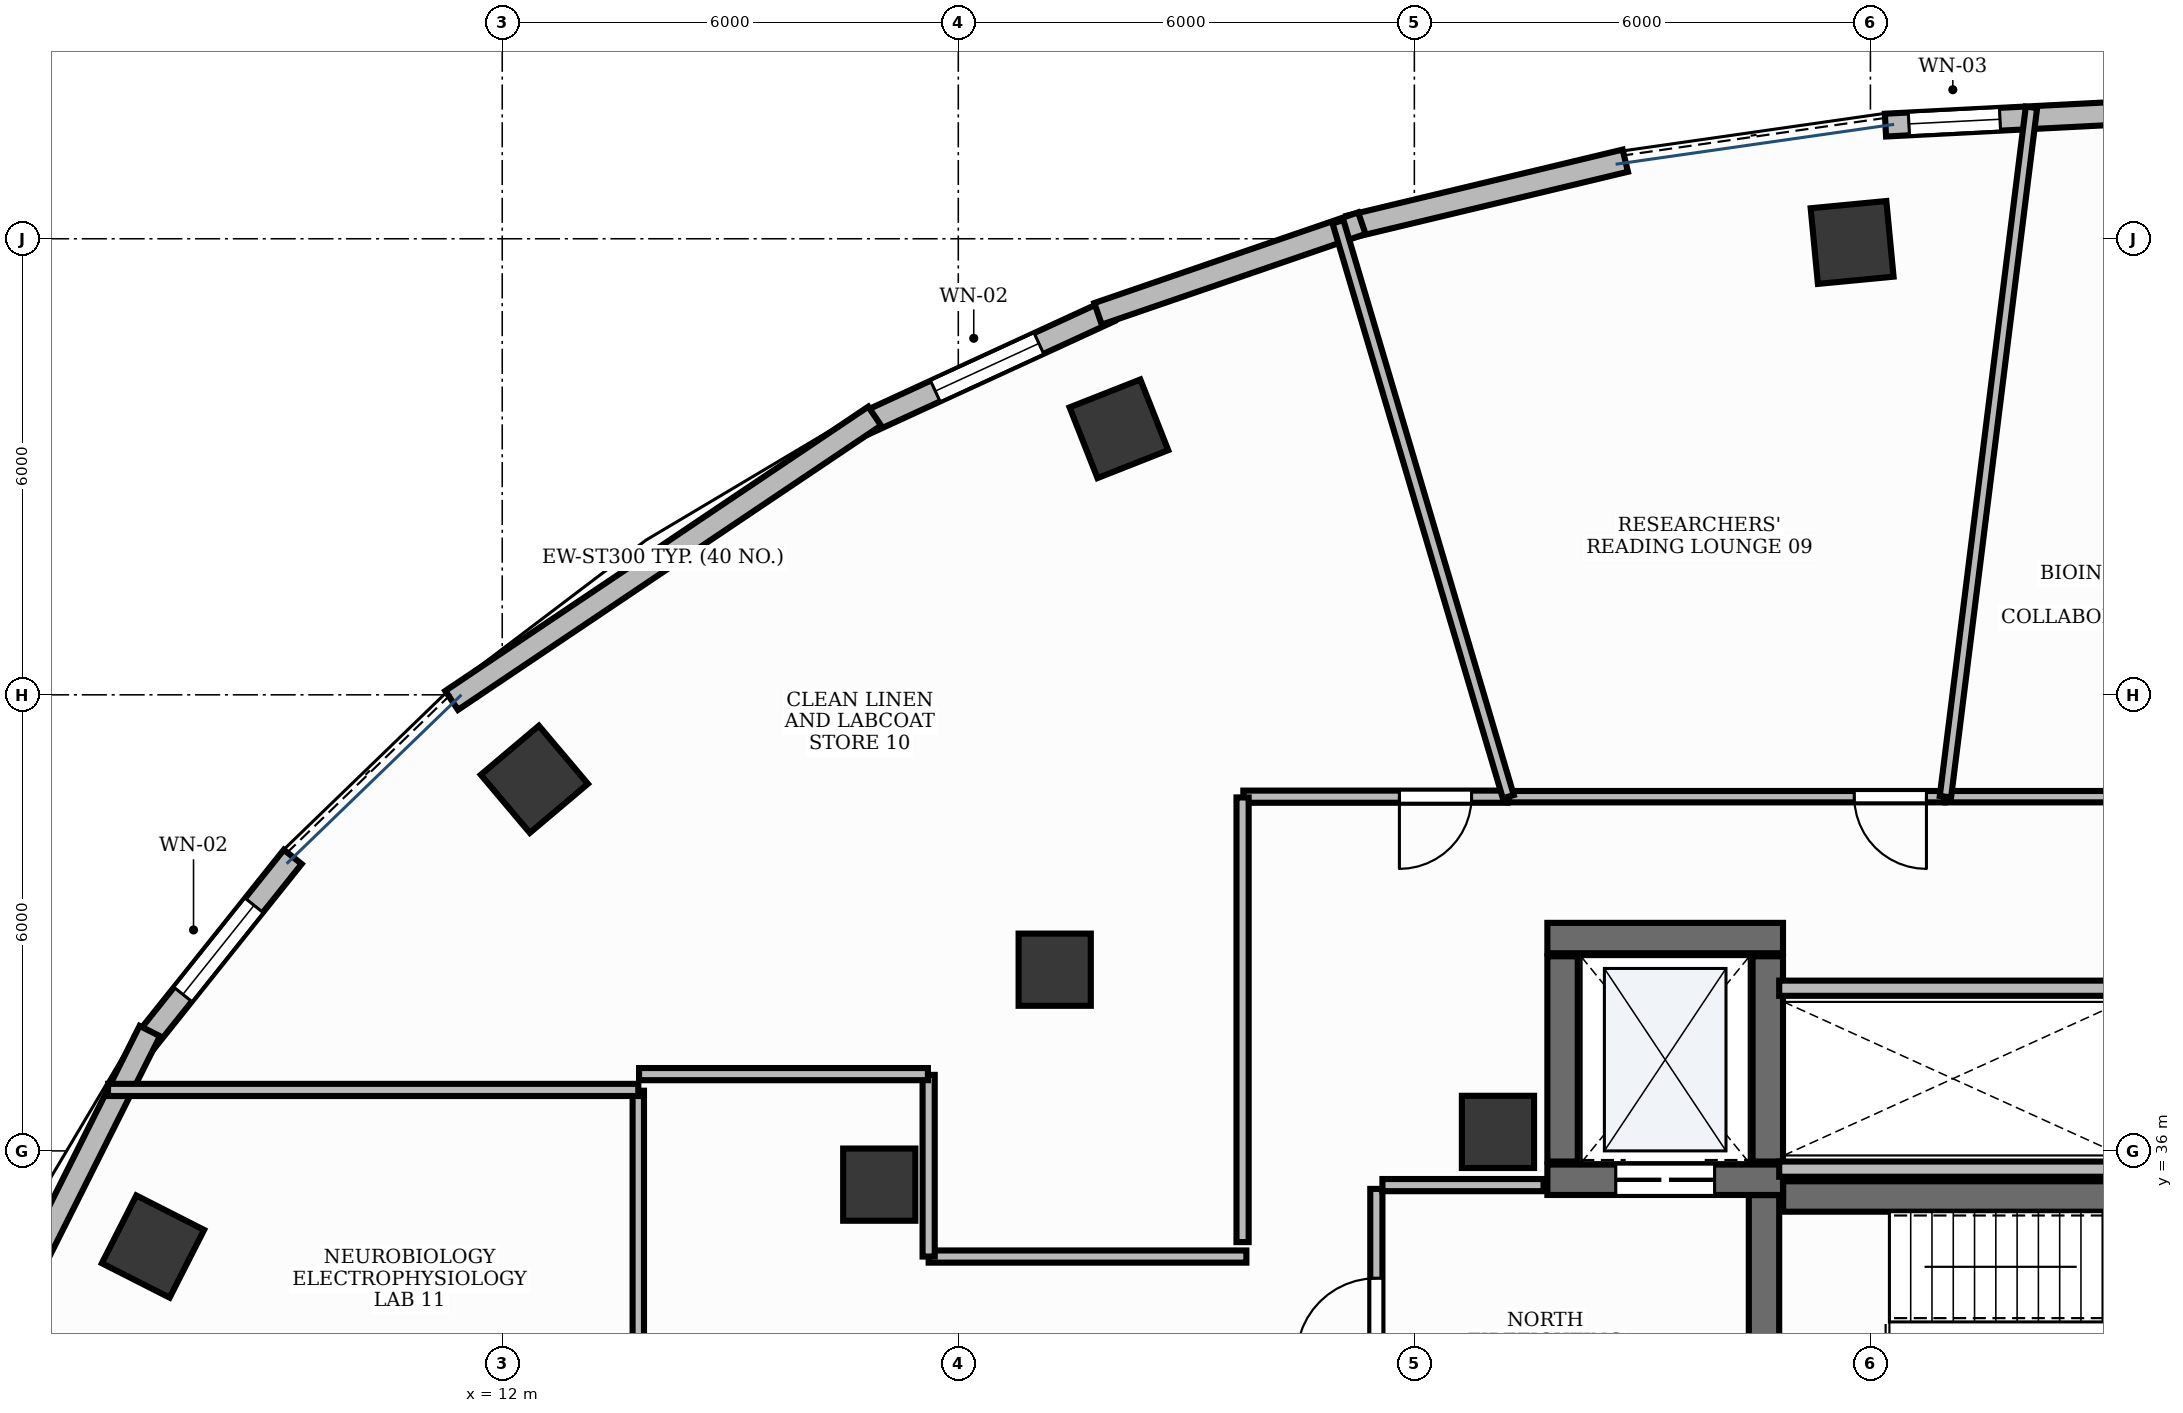
"""IFC4 building model, lengths in metres.
Left out: names, types, materials, properties, quantities, classifications, styles, units other than length and angle.
Written with IfcOpenShell. Run it as: python <this file> out.ifc"""

import sys

from ifc_helpers import new_model, si_unit, direction, frame, frame_2d, origin, origin_2d, place, context, subcontext, project, spatial, rectangle, extrude, element, fill, save


model = new_model("IFC4")
c1 = context("Model", 3, precision=1e-05, world=origin(), true_north=direction((0.0, 1.0)))
c2 = subcontext(c1, "Body", "Model", "MODEL_VIEW")
j1 = project(units=[si_unit("LENGTHUNIT", "METRE"), si_unit("PLANEANGLEUNIT", "RADIAN")], contexts=[c1])
p1 = place(None, origin())
s1 = spatial("IfcSite", under=j1, at=p1, CompositionType="ELEMENT")
p2 = place(p1, origin())
s2 = spatial("IfcBuilding", under=s1, at=p2, CompositionType="ELEMENT")
p3 = place(p2, frame((0.0, 0.0, 218.4)))
s3 = spatial("IfcBuildingStorey", under=s2, at=p3, CompositionType="ELEMENT", Elevation=218.4)
p4 = place(p3, frame((28.852, 35.4, 0.0), z_axis=(0.0, 0.0, 1.0), x_axis=(1.0, 0.0, 0.0)))
e1 = element("IfcWall", 1, at=p4, inside=s3, PredefinedType="SHEAR", context=c2, shape_type="SweptSolid", body=[
    extrude(rectangle(XDim=8.198, YDim=0.4, at=frame_2d((4.099, 0.0))), origin(), (0.0, 0.0, 1.0), 3.9),
])
p5 = place(p3, frame((28.6, 32.11, 0.0), z_axis=(0.0, 0.0, 1.0), x_axis=(0.0, 1.0, 0.0)))
e2 = element("IfcWall", 2, at=p5, inside=s3, PredefinedType="SHEAR", context=c2, shape_type="SweptSolid", body=[
    extrude(rectangle(XDim=3.308, YDim=0.4, at=frame_2d((1.654, 0.0))), origin(), (0.0, 0.0, 1.0), 3.9),
])
p6 = place(p5, frame((0.2, 0.0, 0.0)))
e3 = element("IfcOpeningElement", 3, at=p6, cuts=e2, PredefinedType="OPENING", context=c2, shape_type="SweptSolid", body=[
    extrude(rectangle(XDim=1.05, YDim=2.15, at=frame_2d((0.525, 1.075))), frame((0.0, 0.215, 0.0), z_axis=(0.0, -1.0, 0.0), x_axis=(1.0, 0.0, 0.0)), (0.0, 0.0, 1.0), 0.43),
])
p7 = place(p3, frame((25.75, 38.8, 0.0), z_axis=(0.0, 0.0, 1.0), x_axis=(1.0, 0.0, 0.0)))
e4 = element("IfcWall", 4, at=p7, inside=s3, PredefinedType="SHEAR", context=c2, shape_type="SweptSolid", body=[
    extrude(rectangle(XDim=3.1, YDim=0.4, at=frame_2d((1.55, 0.0))), origin(), (0.0, 0.0, 1.0), 3.9),
])
p8 = place(p3, frame((25.75, 35.62, 0.0), z_axis=(0.0, 0.0, 1.0), x_axis=(1.0, 0.0, 0.0)))
e5 = element("IfcWall", 5, at=p8, inside=s3, PredefinedType="SHEAR", context=c2, shape_type="SweptSolid", body=[
    extrude(rectangle(XDim=3.1, YDim=0.4, at=frame_2d((1.55, 0.0))), origin(), (0.0, 0.0, 1.0), 3.9),
])
p9 = place(p8, frame((0.9, 0.0, 0.0)))
e6 = element("IfcOpeningElement", 6, at=p9, cuts=e5, PredefinedType="OPENING", context=c2, shape_type="SweptSolid", body=[
    extrude(rectangle(XDim=1.3, YDim=2.2, at=frame_2d((0.65, 1.1))), frame((0.0, 0.215, 0.0), z_axis=(0.0, -1.0, 0.0), x_axis=(1.0, 0.0, 0.0)), (0.0, 0.0, 1.0), 0.43),
])
for number, where, z_axis, x_axis in (
    (7, (25.95, 35.86, 0.0), (0.0, 0.0, 1.0), (0.0, 1.0, 0.0)),
    (8, (28.65, 35.86, 0.0), (0.0, 0.0, 1.0), (0.0, 1.0, 0.0)),
):
    element("IfcWall", number, at=place(p3, frame(where, z_axis=z_axis, x_axis=x_axis)), inside=s3, PredefinedType="SHEAR", context=c2, shape_type="SweptSolid", body=[
        extrude(rectangle(XDim=2.7, YDim=0.4, at=frame_2d((1.35, 0.0))), origin(), (0.0, 0.0, 1.0), 3.9),
    ])
p10 = place(p3, frame((25.1, 36.25, -0.0), z_axis=(0.0, 0.0, 1.0), x_axis=(1.0, 0.0, 0.0)))
e9 = element("IfcColumn", 9, at=p10, inside=s3, PredefinedType="PILASTER", context=c2, shape_type="SweptSolid", body=[
    extrude(rectangle(XDim=0.95, YDim=0.95, at=origin_2d()), origin(), (0.0, 0.0, 1.0), 3.901),
])
for number, where, z_axis, x_axis in (
    (10, (29.759, 47.951, -0.0), (0.0, 0.0, 1.0), (0.995, 0.095, 0.0)),
    (11, (20.113, 45.5, -0.0), (0.0, 0.0, 1.0), (0.93, 0.367, 0.0)),
    (12, (12.423, 40.889, -0.0), (0.0, 0.0, 1.0), (0.764, 0.645, 0.0)),
):
    element("IfcColumn", number, at=place(p3, frame(where, z_axis=z_axis, x_axis=x_axis)), inside=s3, PredefinedType="COLUMN", context=c2, shape_type="SweptSolid", body=[
        extrude(rectangle(XDim=1.0, YDim=1.0, at=origin_2d()), origin(), (0.0, 0.0, 1.0), 3.901),
    ])
p11 = place(p3, frame((19.268, 38.384, -0.0), z_axis=(0.0, 0.0, 1.0), x_axis=(1.0, 0.0, 0.0)))
e13 = element("IfcColumn", 13, at=p11, inside=s3, PredefinedType="COLUMN", context=c2, shape_type="SweptSolid", body=[
    extrude(rectangle(XDim=0.95, YDim=0.95, at=origin_2d()), origin(), (0.0, 0.0, 1.0), 3.901),
])
p12 = place(p3, frame((7.405, 34.741, -0.0), z_axis=(0.0, 0.0, 1.0), x_axis=(0.453057191132, 0.891481453292, 0.0)))
e14 = element("IfcColumn", 14, at=p12, inside=s3, PredefinedType="COLUMN", context=c2, shape_type="SweptSolid", body=[
    extrude(rectangle(XDim=1.0, YDim=1.0, at=origin_2d()), origin(), (0.0, 0.0, 1.0), 3.901),
])
p13 = place(p3, frame((16.96, 35.556, -0.0), z_axis=(0.0, 0.0, 1.0), x_axis=(1.0, 0.0, 0.0)))
e15 = element("IfcColumn", 15, at=p13, inside=s3, PredefinedType="COLUMN", context=c2, shape_type="SweptSolid", body=[
    extrude(rectangle(XDim=0.95, YDim=0.95, at=origin_2d()), origin(), (0.0, 0.0, 1.0), 3.901),
])
p14 = place(p3, frame((33.958, 49.688, 0.0), z_axis=(0.0, 0.0, 1.0), x_axis=(-0.998693948377, -0.051092049037, 0.0)))
e16 = element("IfcWall", 16, at=p14, inside=s3, PredefinedType="STANDARD", context=c2, shape_type="SweptSolid", body=[
    extrude(rectangle(XDim=3.765, YDim=0.3, at=frame_2d((1.883, 0.0))), origin(), (0.0, 0.0, 1.0), 3.9),
])
p15 = place(p14, frame((2.257, 0.0, 0.9)))
e17 = element("IfcOpeningElement", 17, at=p15, cuts=e16, PredefinedType="OPENING", context=c2, shape_type="SweptSolid", body=[
    extrude(rectangle(XDim=1.2, YDim=2.7, at=frame_2d((0.6, 1.35))), frame((0.0, 0.165, 0.0), z_axis=(0.0, -1.0, 0.0), x_axis=(1.0, 0.0, 0.0)), (0.0, 0.0, 1.0), 0.33),
])
p16 = place(p3, frame((19.99, 47.051, 0.0), z_axis=(0.0, 0.0, 1.0), x_axis=(-0.908478431596, -0.41793174003, 0.0)))
e18 = element("IfcWall", 18, at=p16, inside=s3, PredefinedType="STANDARD", context=c2, shape_type="SweptSolid", body=[
    extrude(rectangle(XDim=3.547, YDim=0.3, at=frame_2d((1.773, 0.0))), origin(), (0.0, 0.0, 1.0), 3.9),
])
p17 = place(p16, frame((1.023, 0.0, 0.95)))
e19 = element("IfcOpeningElement", 19, at=p17, cuts=e18, PredefinedType="OPENING", context=c2, shape_type="SweptSolid", body=[
    extrude(rectangle(XDim=1.5, YDim=1.8, at=frame_2d((0.75, 0.9))), frame((0.0, 0.165, 0.0), z_axis=(0.0, -1.0, 0.0), x_axis=(1.0, 0.0, 0.0)), (0.0, 0.0, 1.0), 0.33),
])
p18 = place(p3, frame((9.244, 39.868, 0.0), z_axis=(0.0, 0.0, 1.0), x_axis=(-0.624095877763, -0.781347768512, 0.0)))
e20 = element("IfcWall", 20, at=p18, inside=s3, PredefinedType="STANDARD", context=c2, shape_type="SweptSolid", body=[
    extrude(rectangle(XDim=3.132, YDim=0.3, at=frame_2d((1.566, 0.0))), origin(), (0.0, 0.0, 1.0), 3.9),
])
p19 = place(p18, frame((0.816, 0.0, 0.95)))
e21 = element("IfcOpeningElement", 21, at=p19, cuts=e20, PredefinedType="OPENING", context=c2, shape_type="SweptSolid", body=[
    extrude(rectangle(XDim=1.5, YDim=1.8, at=frame_2d((0.75, 0.9))), frame((0.0, 0.165, 0.0), z_axis=(0.0, -1.0, 0.0), x_axis=(1.0, 0.0, 0.0)), (0.0, 0.0, 1.0), 0.33),
])
p20 = place(p3, frame((26.775, 49.027, 0.0), z_axis=(0.0, 0.0, 1.0), x_axis=(-0.972475629939, -0.233004611918, 0.0)))
e22 = element("IfcWall", 22, at=p20, inside=s3, PredefinedType="STANDARD", context=c2, shape_type="SweptSolid", body=[
    extrude(rectangle(XDim=3.735, YDim=0.3, at=frame_2d((1.868, 0.0))), origin(), (0.0, 0.0, 1.0), 3.9),
])
p21 = place(p3, frame((23.309, 48.205, 0.0), z_axis=(0.0, 0.0, 1.0), x_axis=(-0.945722383555, -0.32497565023, 0.0)))
e23 = element("IfcWall", 23, at=p21, inside=s3, PredefinedType="STANDARD", context=c2, shape_type="SweptSolid", body=[
    extrude(rectangle(XDim=3.67, YDim=0.3, at=frame_2d((1.835, 0.0))), origin(), (0.0, 0.0, 1.0), 3.47),
])
p22 = place(p3, frame((16.9, 45.667, 0.0), z_axis=(0.0, 0.0, 1.0), x_axis=(-0.829994558021, -0.557771488743, 0.0)))
e24 = element("IfcWall", 24, at=p22, inside=s3, PredefinedType="STANDARD", context=c2, shape_type="SweptSolid", body=[
    extrude(rectangle(XDim=6.706, YDim=0.3, at=frame_2d((3.353, 0.0))), origin(), (0.0, 0.0, 1.0), 3.9),
])
p23 = place(p3, frame((7.363, 37.577, 0.0), z_axis=(0.0, 0.0, 1.0), x_axis=(-0.448240215972, -0.893913143871, 0.0)))
e25 = element("IfcWall", 25, at=p23, inside=s3, PredefinedType="STANDARD", context=c2, shape_type="SweptSolid", body=[
    extrude(rectangle(XDim=5.896, YDim=0.3, at=frame_2d((2.948, 0.0))), origin(), (0.0, 0.0, 1.0), 3.47),
])
for number, where, z_axis, x_axis in (
    (26, (28.8, 35.76, 0.0), (0.0, 0.0, 1.0), (1.0, 0.0, 0.0)),
    (27, (28.8, 38.14, 0.0), (0.0, 0.0, 1.0), (1.0, 0.0, 0.0)),
):
    element("IfcWall", number, at=place(p3, frame(where, z_axis=z_axis, x_axis=x_axis)), inside=s3, PredefinedType="PARTITIONING", context=c2, shape_type="SweptSolid", body=[
        extrude(rectangle(XDim=4.57, YDim=0.2, at=frame_2d((2.285, 0.0))), origin(), (0.0, 0.0, 1.0), 2.91),
    ])
p24 = place(p3, frame((23.5, 32.1, 0.0), z_axis=(0.0, 0.0, 1.0), x_axis=(0.0, 1.0, 0.0)))
e28 = element("IfcWall", 28, at=p24, inside=s3, PredefinedType="PARTITIONING", context=c2, shape_type="SweptSolid", body=[
    extrude(rectangle(XDim=3.4, YDim=0.16, at=frame_2d((1.7, 0.0))), origin(), (0.0, 0.0, 1.0), 2.91),
])
p25 = place(p24, frame((1.175, 0.0, 0.0)))
e29 = element("IfcOpeningElement", 29, at=p25, cuts=e28, PredefinedType="OPENING", context=c2, shape_type="SweptSolid", body=[
    extrude(rectangle(XDim=1.05, YDim=2.15, at=frame_2d((0.525, 1.075))), frame((0.0, 0.095, 0.0), z_axis=(0.0, -1.0, 0.0), x_axis=(1.0, 0.0, 0.0)), (0.0, 0.0, 1.0), 0.19),
])
p26 = place(p3, frame((23.58, 35.55, 0.0), z_axis=(0.0, 0.0, 1.0), x_axis=(1.0, 0.0, 0.0)))
e30 = element("IfcWall", 30, at=p26, inside=s3, PredefinedType="PARTITIONING", context=c2, shape_type="SweptSolid", body=[
    extrude(rectangle(XDim=2.12, YDim=0.16, at=frame_2d((1.06, 0.0))), origin(), (0.0, 0.0, 1.0), 2.91),
])
p27 = place(p3, frame((35.483, 40.66, 0.0), z_axis=(0.0, 0.0, 1.0), x_axis=(-1.0, 0.0, 0.0)))
e31 = element("IfcWall", 31, at=p27, inside=s3, PredefinedType="PARTITIONING", context=c2, shape_type="SweptSolid", body=[
    extrude(rectangle(XDim=4.496, YDim=0.15, at=frame_2d((2.248, 0.0))), origin(), (0.0, 0.0, 1.0), 2.91),
])
p28 = place(p27, frame((0.24, 0.0, 0.0)))
e32 = element("IfcOpeningElement", 32, at=p28, cuts=e31, PredefinedType="OPENING", context=c2, shape_type="SweptSolid", body=[
    extrude(rectangle(XDim=0.95, YDim=2.15, at=frame_2d((0.475, 1.075))), frame((0.0, 0.09, 0.0), z_axis=(0.0, -1.0, 0.0), x_axis=(1.0, 0.0, 0.0)), (0.0, 0.0, 1.0), 0.18),
])
p29 = place(p3, frame((30.977, 40.66, 0.0), z_axis=(0.0, 0.0, 1.0), x_axis=(-1.0, 0.0, 0.0)))
e33 = element("IfcWall", 33, at=p29, inside=s3, PredefinedType="PARTITIONING", context=c2, shape_type="SweptSolid", body=[
    extrude(rectangle(XDim=5.741, YDim=0.15, at=frame_2d((2.871, 0.0))), origin(), (0.0, 0.0, 1.0), 2.91),
])
p30 = place(p29, frame((0.24, 0.0, 0.0)))
e34 = element("IfcOpeningElement", 34, at=p30, cuts=e33, PredefinedType="OPENING", context=c2, shape_type="SweptSolid", body=[
    extrude(rectangle(XDim=0.95, YDim=2.15, at=frame_2d((0.475, 1.075))), frame((0.0, 0.09, 0.0), z_axis=(0.0, -1.0, 0.0), x_axis=(1.0, 0.0, 0.0)), (0.0, 0.0, 1.0), 0.18),
])
p31 = place(p3, frame((25.226, 40.66, 0.0), z_axis=(0.0, 0.0, 1.0), x_axis=(-1.0, 0.0, 0.0)))
e35 = element("IfcWall", 35, at=p31, inside=s3, PredefinedType="PARTITIONING", context=c2, shape_type="SweptSolid", body=[
    extrude(rectangle(XDim=3.476, YDim=0.16, at=frame_2d((1.738, 0.0))), origin(), (0.0, 0.0, 1.0), 2.91),
])
p32 = place(p31, frame((0.472, 0.0, 0.0)))
e36 = element("IfcOpeningElement", 36, at=p32, cuts=e35, PredefinedType="OPENING", context=c2, shape_type="SweptSolid", body=[
    extrude(rectangle(XDim=0.95, YDim=2.15, at=frame_2d((0.475, 1.075))), frame((0.0, 0.095, 0.0), z_axis=(0.0, -1.0, 0.0), x_axis=(1.0, 0.0, 0.0)), (0.0, 0.0, 1.0), 0.19),
])
p33 = place(p3, frame((13.79, 36.792, 0.0), z_axis=(0.0, 0.0, 1.0), x_axis=(0.0, -1.0, 0.0)))
e37 = element("IfcWall", 37, at=p33, inside=s3, PredefinedType="PARTITIONING", context=c2, shape_type="SweptSolid", body=[
    extrude(rectangle(XDim=4.782, YDim=0.15, at=frame_2d((2.391, 0.0))), origin(), (0.0, 0.0, 1.0), 2.91),
])
p34 = place(p33, frame((3.312, 0.0, 0.0)))
e38 = element("IfcOpeningElement", 38, at=p34, cuts=e37, PredefinedType="OPENING", context=c2, shape_type="SweptSolid", body=[
    extrude(rectangle(XDim=0.95, YDim=2.15, at=frame_2d((0.475, 1.075))), frame((0.0, 0.09, 0.0), z_axis=(0.0, -1.0, 0.0), x_axis=(1.0, 0.0, 0.0)), (0.0, 0.0, 1.0), 0.18),
])
p35 = place(p3, frame((30.987, 40.66, 0.0), z_axis=(0.0, 0.0, 1.0), x_axis=(0.123837473271, 0.992302514465, 0.0)))
e39 = element("IfcWall", 39, at=p35, inside=s3, PredefinedType="PARTITIONING", context=c2, shape_type="SweptSolid", body=[
    extrude(rectangle(XDim=9.14, YDim=0.15, at=frame_2d((4.57, 0.0))), origin(), (0.0, 0.0, 1.0), 2.91),
])
p36 = place(p3, frame((25.236, 40.66, 0.0), z_axis=(0.0, 0.0, 1.0), x_axis=(-0.284007193362, 0.958822149368, 0.0)))
e40 = element("IfcWall", 40, at=p36, inside=s3, PredefinedType="PARTITIONING", context=c2, shape_type="SweptSolid", body=[
    extrude(rectangle(XDim=7.889, YDim=0.15, at=frame_2d((3.944, 0.0))), origin(), (0.0, 0.0, 1.0), 2.91),
])
p37 = place(p3, frame((21.74, 40.65, 0.0), z_axis=(0.0, 0.0, 1.0), x_axis=(0.0, -1.0, 0.0)))
e41 = element("IfcWall", 41, at=p37, inside=s3, PredefinedType="PARTITIONING", context=c2, shape_type="SweptSolid", body=[
    extrude(rectangle(XDim=5.85, YDim=0.16, at=frame_2d((2.925, 0.0))), origin(), (0.0, 0.0, 1.0), 2.91),
])
p38 = place(p3, frame((21.79, 34.61, 0.0), z_axis=(0.0, 0.0, 1.0), x_axis=(-1.0, 0.0, 0.0)))
e42 = element("IfcWall", 42, at=p38, inside=s3, PredefinedType="PARTITIONING", context=c2, shape_type="SweptSolid", body=[
    extrude(rectangle(XDim=4.18, YDim=0.16, at=frame_2d((2.09, 0.0))), origin(), (0.0, 0.0, 1.0), 2.91),
])
p39 = place(p3, frame((17.61, 34.61, 0.0), z_axis=(0.0, 0.0, 1.0), x_axis=(0.0, 1.0, 0.0)))
e43 = element("IfcWall", 43, at=p39, inside=s3, PredefinedType="PARTITIONING", context=c2, shape_type="SweptSolid", body=[
    extrude(rectangle(XDim=2.39, YDim=0.16, at=frame_2d((1.195, 0.0))), origin(), (0.0, 0.0, 1.0), 2.91),
])
p40 = place(p3, frame((17.6, 37.01, 0.0), z_axis=(0.0, 0.0, 1.0), x_axis=(-1.0, 0.0, 0.0)))
e44 = element("IfcWall", 44, at=p40, inside=s3, PredefinedType="PARTITIONING", context=c2, shape_type="SweptSolid", body=[
    extrude(rectangle(XDim=3.8, YDim=0.16, at=frame_2d((1.9, 0.0))), origin(), (0.0, 0.0, 1.0), 2.91),
])
p41 = place(p3, frame((13.79, 36.802, 0.0), z_axis=(0.0, 0.0, 1.0), x_axis=(-1.0, 0.0, 0.0)))
e45 = element("IfcWall", 45, at=p41, inside=s3, PredefinedType="PARTITIONING", context=c2, shape_type="SweptSolid", body=[
    extrude(rectangle(XDim=6.976, YDim=0.16, at=frame_2d((3.488, 0.0))), origin(), (0.0, 0.0, 1.0), 2.91),
])
p42 = place(p15, origin())
e46 = element("IfcWindow", 46, at=p42, inside=s3, PartitioningType="SINGLE_PANEL", PredefinedType="WINDOW", context=c2, shape_type="SweptSolid", body=[
    extrude(rectangle(XDim=1.2, YDim=2.7, at=frame_2d((0.6, 1.35))), frame((0.0, 0.03, 0.0), z_axis=(0.0, -1.0, 0.0), x_axis=(1.0, 0.0, 0.0)), (0.0, 0.0, 1.0), 0.06),
])
fill(e17, e46)
p43 = place(p17, origin())
e47 = element("IfcWindow", 47, at=p43, inside=s3, PartitioningType="DOUBLE_PANEL_VERTICAL", PredefinedType="WINDOW", context=c2, shape_type="SweptSolid", body=[
    extrude(rectangle(XDim=1.5, YDim=1.8, at=frame_2d((0.75, 0.9))), frame((0.0, 0.03, 0.0), z_axis=(0.0, -1.0, 0.0), x_axis=(1.0, 0.0, 0.0)), (0.0, 0.0, 1.0), 0.06),
])
fill(e19, e47)
p44 = place(p19, origin())
e48 = element("IfcWindow", 48, at=p44, inside=s3, PartitioningType="DOUBLE_PANEL_VERTICAL", PredefinedType="WINDOW", context=c2, shape_type="SweptSolid", body=[
    extrude(rectangle(XDim=1.5, YDim=1.8, at=frame_2d((0.75, 0.9))), frame((0.0, 0.03, 0.0), z_axis=(0.0, -1.0, 0.0), x_axis=(1.0, 0.0, 0.0)), (0.0, 0.0, 1.0), 0.06),
])
fill(e21, e48)
p45 = place(p9, origin())
e49 = element("IfcDoor", 49, at=p45, inside=s3, OperationType="DOUBLE_DOOR_SLIDING", PredefinedType="DOOR", context=c2, shape_type="SweptSolid", body=[
    extrude(rectangle(XDim=1.3, YDim=2.2, at=frame_2d((0.65, 1.1))), frame((0.0, 0.025, 0.0), z_axis=(0.0, -1.0, 0.0), x_axis=(1.0, 0.0, 0.0)), (0.0, 0.0, 1.0), 0.05),
])
fill(e6, e49)
p46 = place(p25, origin())
e50 = element("IfcDoor", 50, at=p46, inside=s3, OperationType="SINGLE_SWING_LEFT", PredefinedType="DOOR", context=c2, shape_type="SweptSolid", body=[
    extrude(rectangle(XDim=1.05, YDim=2.15, at=frame_2d((0.525, 1.075))), frame((0.0, 0.025, 0.0), z_axis=(0.0, -1.0, 0.0), x_axis=(1.0, 0.0, 0.0)), (0.0, 0.0, 1.0), 0.05),
])
fill(e29, e50)
p47 = place(p30, origin())
e51 = element("IfcDoor", 51, at=p47, inside=s3, OperationType="SINGLE_SWING_LEFT", PredefinedType="DOOR", context=c2, shape_type="SweptSolid", body=[
    extrude(rectangle(XDim=0.95, YDim=2.15, at=frame_2d((0.475, 1.075))), frame((0.0, 0.025, 0.0), z_axis=(0.0, -1.0, 0.0), x_axis=(1.0, 0.0, 0.0)), (0.0, 0.0, 1.0), 0.05),
])
fill(e34, e51)
p48 = place(p32, origin())
e52 = element("IfcDoor", 52, at=p48, inside=s3, OperationType="SINGLE_SWING_RIGHT", PredefinedType="DOOR", context=c2, shape_type="SweptSolid", body=[
    extrude(rectangle(XDim=0.95, YDim=2.15, at=frame_2d((0.475, 1.075))), frame((0.0, 0.025, 0.0), z_axis=(0.0, -1.0, 0.0), x_axis=(1.0, 0.0, 0.0)), (0.0, 0.0, 1.0), 0.05),
])
fill(e36, e52)
save(model, sys.argv[1])
